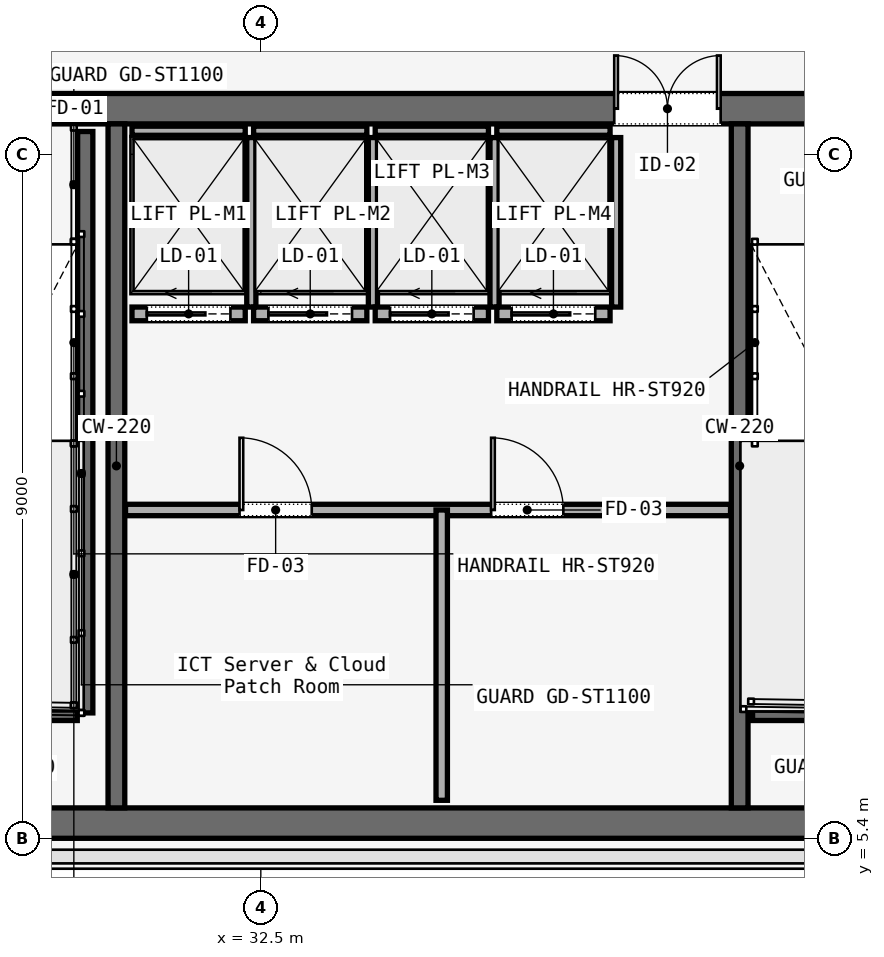
"""IFC4 building model, lengths in metres.
Left out: names, types, materials, properties, quantities, classifications, styles, units other than length and angle.
Written with IfcOpenShell. Run it as: python <this file> out.ifc"""

import sys

from ifc_helpers import new_model, si_unit, direction, frame, frame_2d, origin, place, context, subcontext, project, spatial, rectangle, extrude, element, fill, save


model = new_model("IFC4")
c1 = context("Model", 3, precision=1e-05, world=origin(), true_north=direction((0.0, 1.0)))
c2 = subcontext(c1, "Body", "Model", "MODEL_VIEW")
j1 = project(units=[si_unit("LENGTHUNIT", "METRE"), si_unit("PLANEANGLEUNIT", "RADIAN")], contexts=[c1])
p1 = place(None, origin())
s1 = spatial("IfcSite", under=j1, at=p1, CompositionType="ELEMENT")
p2 = place(p1, origin())
s2 = spatial("IfcBuilding", under=s1, at=p2, CompositionType="ELEMENT")
p3 = place(p2, frame((0.0, 0.0, 184.0)))
s3 = spatial("IfcBuildingStorey", under=s2, at=p3, CompositionType="ELEMENT", Elevation=184.0)
p4 = place(p3, frame((26.45, 15.0, 0.0), z_axis=(0.0, 0.0, 1.0), x_axis=(1.0, 0.0, 0.0)))
e1 = element("IfcWall", 1, at=p4, inside=s3, PredefinedType="SOLIDWALL", context=c2, shape_type="SweptSolid", body=[
    extrude(rectangle(XDim=31.1, YDim=0.4, at=frame_2d((15.55, 0.0))), origin(), (0.0, 0.0, 1.0), 3.58),
])
p5 = place(p4, frame((1.65, 0.0, 0.0)))
e2 = element("IfcOpeningElement", 2, at=p5, cuts=e1, PredefinedType="OPENING", context=c2, shape_type="SweptSolid", body=[
    extrude(rectangle(XDim=1.1, YDim=2.2, at=frame_2d((0.55, 1.1))), frame((0.0, 0.2, 0.0), z_axis=(0.0, -1.0, 0.0), x_axis=(1.0, 0.0, 0.0)), (0.0, 0.0, 1.0), 0.4),
])
p6 = place(p4, frame((13.65, 0.0, 0.0)))
e3 = element("IfcOpeningElement", 3, at=p6, cuts=e1, PredefinedType="OPENING", context=c2, shape_type="SweptSolid", body=[
    extrude(rectangle(XDim=1.1, YDim=2.2, at=frame_2d((0.55, 1.1))), frame((0.0, 0.2, 0.0), z_axis=(0.0, -1.0, 0.0), x_axis=(1.0, 0.0, 0.0)), (0.0, 0.0, 1.0), 0.4),
])
p7 = place(p4, frame((25.55, 0.0, 0.0)))
e4 = element("IfcOpeningElement", 4, at=p7, cuts=e1, PredefinedType="OPENING", context=c2, shape_type="SweptSolid", body=[
    extrude(rectangle(XDim=1.1, YDim=2.2, at=frame_2d((0.55, 1.1))), frame((0.0, 0.2, 0.0), z_axis=(0.0, -1.0, 0.0), x_axis=(1.0, 0.0, 0.0)), (0.0, 0.0, 1.0), 0.4),
])
p8 = place(p4, frame((10.7, 0.0, 0.0)))
e5 = element("IfcOpeningElement", 5, at=p8, cuts=e1, PredefinedType="OPENING", context=c2, shape_type="SweptSolid", body=[
    extrude(rectangle(XDim=1.4, YDim=2.2, at=frame_2d((0.7, 1.1))), frame((0.0, 0.2, 0.0), z_axis=(0.0, -1.0, 0.0), x_axis=(1.0, 0.0, 0.0)), (0.0, 0.0, 1.0), 0.4),
])
p9 = place(p4, frame((19.35, 0.0, 0.0)))
e6 = element("IfcOpeningElement", 6, at=p9, cuts=e1, PredefinedType="OPENING", context=c2, shape_type="SweptSolid", body=[
    extrude(rectangle(XDim=1.1, YDim=2.2, at=frame_2d((0.55, 1.1))), frame((0.0, 0.2, 0.0), z_axis=(0.0, -1.0, 0.0), x_axis=(1.0, 0.0, 0.0)), (0.0, 0.0, 1.0), 0.4),
])
p10 = place(p4, frame((21.4, 0.0, 0.0)))
e7 = element("IfcOpeningElement", 7, at=p10, cuts=e1, PredefinedType="OPENING", context=c2, shape_type="SweptSolid", body=[
    extrude(rectangle(XDim=0.9, YDim=2.1, at=frame_2d((0.45, 1.05))), frame((0.0, 0.2, 0.0), z_axis=(0.0, -1.0, 0.0), x_axis=(1.0, 0.0, 0.0)), (0.0, 0.0, 1.0), 0.4),
])
p11 = place(p4, frame((23.35, 0.0, 0.0)))
e8 = element("IfcOpeningElement", 8, at=p11, cuts=e1, PredefinedType="OPENING", context=c2, shape_type="SweptSolid", body=[
    extrude(rectangle(XDim=1.3, YDim=2.3, at=frame_2d((0.65, 1.15))), frame((0.0, 0.2, 0.0), z_axis=(0.0, -1.0, 0.0), x_axis=(1.0, 0.0, 0.0)), (0.0, 0.0, 1.0), 0.4),
])
p12 = place(p3, frame((26.45, 5.6, 0.0), z_axis=(0.0, 0.0, 1.0), x_axis=(1.0, 0.0, 0.0)))
e9 = element("IfcWall", 9, at=p12, inside=s3, PredefinedType="SOLIDWALL", context=c2, shape_type="SweptSolid", body=[
    extrude(rectangle(XDim=31.1, YDim=0.4, at=frame_2d((15.55, 0.0))), origin(), (0.0, 0.0, 1.0), 3.58),
])
for number, where, z_axis, x_axis in (
    (10, (30.6, 5.8, 0.0), (0.0, 0.0, 1.0), (0.0, 1.0, 0.0)),
    (11, (38.8, 5.8, 0.0), (0.0, 0.0, 1.0), (0.0, 1.0, 0.0)),
):
    element("IfcWall", number, at=place(p3, frame(where, z_axis=z_axis, x_axis=x_axis)), inside=s3, PredefinedType="SOLIDWALL", context=c2, shape_type="SweptSolid", body=[
        extrude(rectangle(XDim=9.0, YDim=0.22, at=frame_2d((4.5, 0.0))), origin(), (0.0, 0.0, 1.0), 3.58),
    ])
p13 = place(p3, frame((30.19, 14.7, 0.0), z_axis=(0.0, 0.0, 1.0), x_axis=(0.0, -1.0, 0.0)))
e12 = element("IfcWall", 12, at=p13, inside=s3, PredefinedType="SOLIDWALL", context=c2, shape_type="SweptSolid", body=[
    extrude(rectangle(XDim=7.65, YDim=0.2, at=frame_2d((3.825, 0.0))), origin(), (0.0, 0.0, 1.0), 3.8),
])
for number, where, z_axis, x_axis in (
    (13, (26.97, 7.05, 0.0), (0.0, 0.0, 1.0), (1.0, 0.0, 0.0)),
    (14, (38.97, 7.05, 0.0), (0.0, 0.0, 1.0), (1.0, 0.0, 0.0)),
):
    element("IfcWall", number, at=place(p3, frame(where, z_axis=z_axis, x_axis=x_axis)), inside=s3, PredefinedType="SOLIDWALL", context=c2, shape_type="SweptSolid", body=[
        extrude(rectangle(XDim=3.115, YDim=0.2, at=frame_2d((1.558, 0.0))), origin(), (0.0, 0.0, 1.0), 3.8),
    ])
p14 = place(p3, frame((30.72, 9.72, 0.0), z_axis=(0.0, 0.0, 1.0), x_axis=(1.0, 0.0, 0.0)))
e15 = element("IfcWall", 15, at=p14, inside=s3, PredefinedType="PARTITIONING", context=c2, shape_type="SweptSolid", body=[
    extrude(rectangle(XDim=7.96, YDim=0.15, at=frame_2d((3.98, 0.0))), origin(), (0.0, 0.0, 1.0), 3.01),
])
p15 = place(p14, frame((1.5, 0.0, 0.0)))
e16 = element("IfcOpeningElement", 16, at=p15, cuts=e15, PredefinedType="OPENING", context=c2, shape_type="SweptSolid", body=[
    extrude(rectangle(XDim=0.95, YDim=2.2, at=frame_2d((0.475, 1.1))), frame((0.0, 0.075, 0.0), z_axis=(0.0, -1.0, 0.0), x_axis=(1.0, 0.0, 0.0)), (0.0, 0.0, 1.0), 0.15),
])
p16 = place(p14, frame((4.81, 0.0, 0.0)))
e17 = element("IfcOpeningElement", 17, at=p16, cuts=e15, PredefinedType="OPENING", context=c2, shape_type="SweptSolid", body=[
    extrude(rectangle(XDim=0.95, YDim=2.2, at=frame_2d((0.475, 1.1))), frame((0.0, 0.075, 0.0), z_axis=(0.0, -1.0, 0.0), x_axis=(1.0, 0.0, 0.0)), (0.0, 0.0, 1.0), 0.15),
])
p17 = place(p3, frame((34.88, 5.9, 0.0), z_axis=(0.0, 0.0, 1.0), x_axis=(0.0, 1.0, 0.0)))
e18 = element("IfcWall", 18, at=p17, inside=s3, PredefinedType="PARTITIONING", context=c2, shape_type="SweptSolid", body=[
    extrude(rectangle(XDim=3.82, YDim=0.15, at=frame_2d((1.91, 0.0))), origin(), (0.0, 0.0, 1.0), 3.01),
])
p18 = place(p3, frame((30.805, 12.3, 0.0), z_axis=(0.0, 0.0, 1.0), x_axis=(1.0, 0.0, 0.0)))
e19 = element("IfcWall", 19, at=p18, inside=s3, PredefinedType="SOLIDWALL", context=c2, shape_type="SweptSolid", body=[
    extrude(rectangle(XDim=1.49, YDim=0.18, at=frame_2d((0.745, 0.0))), origin(), (0.0, 0.0, 1.0), 3.01),
])
p19 = place(p18, frame((0.195, 0.0, 0.0)))
e20 = element("IfcOpeningElement", 20, at=p19, cuts=e19, PredefinedType="OPENING", context=c2, shape_type="SweptSolid", body=[
    extrude(rectangle(XDim=1.1, YDim=2.2, at=frame_2d((0.55, 1.1))), frame((0.0, 0.09, 0.0), z_axis=(0.0, -1.0, 0.0), x_axis=(1.0, 0.0, 0.0)), (0.0, 0.0, 1.0), 0.18),
])
p20 = place(p3, frame((30.805, 14.71, 0.0), z_axis=(0.0, 0.0, 1.0), x_axis=(1.0, 0.0, 0.0)))
e21 = element("IfcWall", 21, at=p20, inside=s3, PredefinedType="SOLIDWALL", context=c2, shape_type="SweptSolid", body=[
    extrude(rectangle(XDim=1.49, YDim=0.12, at=frame_2d((0.745, 0.0))), origin(), (0.0, 0.0, 1.0), 3.01),
])
p21 = place(p3, frame((32.375, 12.39, 0.0), z_axis=(0.0, 0.0, 1.0), x_axis=(0.0, 1.0, 0.0)))
e22 = element("IfcWall", 22, at=p21, inside=s3, PredefinedType="SOLIDWALL", context=c2, shape_type="SweptSolid", body=[
    extrude(rectangle(XDim=2.23, YDim=0.12, at=frame_2d((1.115, 0.0))), origin(), (0.0, 0.0, 1.0), 3.01),
])
p22 = place(p3, frame((32.405, 12.3, 0.0), z_axis=(0.0, 0.0, 1.0), x_axis=(1.0, 0.0, 0.0)))
e23 = element("IfcWall", 23, at=p22, inside=s3, PredefinedType="SOLIDWALL", context=c2, shape_type="SweptSolid", body=[
    extrude(rectangle(XDim=1.49, YDim=0.18, at=frame_2d((0.745, 0.0))), origin(), (0.0, 0.0, 1.0), 3.01),
])
p23 = place(p22, frame((0.195, 0.0, 0.0)))
e24 = element("IfcOpeningElement", 24, at=p23, cuts=e23, PredefinedType="OPENING", context=c2, shape_type="SweptSolid", body=[
    extrude(rectangle(XDim=1.1, YDim=2.2, at=frame_2d((0.55, 1.1))), frame((0.0, 0.09, 0.0), z_axis=(0.0, -1.0, 0.0), x_axis=(1.0, 0.0, 0.0)), (0.0, 0.0, 1.0), 0.18),
])
p24 = place(p3, frame((32.405, 14.71, 0.0), z_axis=(0.0, 0.0, 1.0), x_axis=(1.0, 0.0, 0.0)))
e25 = element("IfcWall", 25, at=p24, inside=s3, PredefinedType="SOLIDWALL", context=c2, shape_type="SweptSolid", body=[
    extrude(rectangle(XDim=1.49, YDim=0.12, at=frame_2d((0.745, 0.0))), origin(), (0.0, 0.0, 1.0), 3.01),
])
p25 = place(p3, frame((33.975, 12.39, 0.0), z_axis=(0.0, 0.0, 1.0), x_axis=(0.0, 1.0, 0.0)))
e26 = element("IfcWall", 26, at=p25, inside=s3, PredefinedType="SOLIDWALL", context=c2, shape_type="SweptSolid", body=[
    extrude(rectangle(XDim=2.23, YDim=0.12, at=frame_2d((1.115, 0.0))), origin(), (0.0, 0.0, 1.0), 3.01),
])
p26 = place(p3, frame((34.005, 12.3, 0.0), z_axis=(0.0, 0.0, 1.0), x_axis=(1.0, 0.0, 0.0)))
e27 = element("IfcWall", 27, at=p26, inside=s3, PredefinedType="SOLIDWALL", context=c2, shape_type="SweptSolid", body=[
    extrude(rectangle(XDim=1.49, YDim=0.18, at=frame_2d((0.745, 0.0))), origin(), (0.0, 0.0, 1.0), 3.01),
])
p27 = place(p26, frame((0.195, 0.0, 0.0)))
e28 = element("IfcOpeningElement", 28, at=p27, cuts=e27, PredefinedType="OPENING", context=c2, shape_type="SweptSolid", body=[
    extrude(rectangle(XDim=1.1, YDim=2.2, at=frame_2d((0.55, 1.1))), frame((0.0, 0.09, 0.0), z_axis=(0.0, -1.0, 0.0), x_axis=(1.0, 0.0, 0.0)), (0.0, 0.0, 1.0), 0.18),
])
p28 = place(p3, frame((34.005, 14.71, 0.0), z_axis=(0.0, 0.0, 1.0), x_axis=(1.0, 0.0, 0.0)))
e29 = element("IfcWall", 29, at=p28, inside=s3, PredefinedType="SOLIDWALL", context=c2, shape_type="SweptSolid", body=[
    extrude(rectangle(XDim=1.49, YDim=0.12, at=frame_2d((0.745, 0.0))), origin(), (0.0, 0.0, 1.0), 3.01),
])
p29 = place(p3, frame((35.575, 12.39, 0.0), z_axis=(0.0, 0.0, 1.0), x_axis=(0.0, 1.0, 0.0)))
e30 = element("IfcWall", 30, at=p29, inside=s3, PredefinedType="SOLIDWALL", context=c2, shape_type="SweptSolid", body=[
    extrude(rectangle(XDim=2.23, YDim=0.12, at=frame_2d((1.115, 0.0))), origin(), (0.0, 0.0, 1.0), 3.01),
])
p30 = place(p3, frame((35.605, 12.3, 0.0), z_axis=(0.0, 0.0, 1.0), x_axis=(1.0, 0.0, 0.0)))
e31 = element("IfcWall", 31, at=p30, inside=s3, PredefinedType="SOLIDWALL", context=c2, shape_type="SweptSolid", body=[
    extrude(rectangle(XDim=1.49, YDim=0.18, at=frame_2d((0.745, 0.0))), origin(), (0.0, 0.0, 1.0), 3.01),
])
p31 = place(p30, frame((0.195, 0.0, 0.0)))
e32 = element("IfcOpeningElement", 32, at=p31, cuts=e31, PredefinedType="OPENING", context=c2, shape_type="SweptSolid", body=[
    extrude(rectangle(XDim=1.1, YDim=2.2, at=frame_2d((0.55, 1.1))), frame((0.0, 0.09, 0.0), z_axis=(0.0, -1.0, 0.0), x_axis=(1.0, 0.0, 0.0)), (0.0, 0.0, 1.0), 0.18),
])
p32 = place(p3, frame((35.605, 14.71, 0.0), z_axis=(0.0, 0.0, 1.0), x_axis=(1.0, 0.0, 0.0)))
e33 = element("IfcWall", 33, at=p32, inside=s3, PredefinedType="SOLIDWALL", context=c2, shape_type="SweptSolid", body=[
    extrude(rectangle(XDim=1.49, YDim=0.12, at=frame_2d((0.745, 0.0))), origin(), (0.0, 0.0, 1.0), 3.01),
])
p33 = place(p3, frame((37.175, 12.39, 0.0), z_axis=(0.0, 0.0, 1.0), x_axis=(0.0, 1.0, 0.0)))
e34 = element("IfcWall", 34, at=p33, inside=s3, PredefinedType="SOLIDWALL", context=c2, shape_type="SweptSolid", body=[
    extrude(rectangle(XDim=2.23, YDim=0.12, at=frame_2d((1.115, 0.0))), origin(), (0.0, 0.0, 1.0), 3.01),
])
p34 = place(p8, origin())
e35 = element("IfcDoor", 35, at=p34, inside=s3, OperationType="DOUBLE_DOOR_SINGLE_SWING", PredefinedType="DOOR", context=c2, shape_type="SweptSolid", body=[
    extrude(rectangle(XDim=1.4, YDim=2.2, at=frame_2d((0.7, 1.1))), frame((0.0, 0.025, 0.0), z_axis=(0.0, -1.0, 0.0), x_axis=(1.0, 0.0, 0.0)), (0.0, 0.0, 1.0), 0.05),
])
fill(e5, e35)
p35 = place(p15, origin())
e36 = element("IfcDoor", 36, at=p35, inside=s3, OperationType="SINGLE_SWING_LEFT", PredefinedType="DOOR", context=c2, shape_type="SweptSolid", body=[
    extrude(rectangle(XDim=0.95, YDim=2.2, at=frame_2d((0.475, 1.1))), frame((0.0, 0.025, 0.0), z_axis=(0.0, -1.0, 0.0), x_axis=(1.0, 0.0, 0.0)), (0.0, 0.0, 1.0), 0.05),
])
fill(e16, e36)
p36 = place(p16, origin())
e37 = element("IfcDoor", 37, at=p36, inside=s3, OperationType="SINGLE_SWING_RIGHT", PredefinedType="DOOR", context=c2, shape_type="SweptSolid", body=[
    extrude(rectangle(XDim=0.95, YDim=2.2, at=frame_2d((0.475, 1.1))), frame((0.0, 0.025, 0.0), z_axis=(0.0, -1.0, 0.0), x_axis=(1.0, 0.0, 0.0)), (0.0, 0.0, 1.0), 0.05),
])
fill(e17, e37)
p37 = place(p19, origin())
e38 = element("IfcDoor", 38, at=p37, inside=s3, OperationType="SLIDING_TO_LEFT", PredefinedType="DOOR", context=c2, shape_type="SweptSolid", body=[
    extrude(rectangle(XDim=1.1, YDim=2.2, at=frame_2d((0.55, 1.1))), frame((0.0, 0.025, 0.0), z_axis=(0.0, -1.0, 0.0), x_axis=(1.0, 0.0, 0.0)), (0.0, 0.0, 1.0), 0.05),
])
fill(e20, e38)
p38 = place(p23, origin())
e39 = element("IfcDoor", 39, at=p38, inside=s3, OperationType="SLIDING_TO_LEFT", PredefinedType="DOOR", context=c2, shape_type="SweptSolid", body=[
    extrude(rectangle(XDim=1.1, YDim=2.2, at=frame_2d((0.55, 1.1))), frame((0.0, 0.025, 0.0), z_axis=(0.0, -1.0, 0.0), x_axis=(1.0, 0.0, 0.0)), (0.0, 0.0, 1.0), 0.05),
])
fill(e24, e39)
p39 = place(p27, origin())
e40 = element("IfcDoor", 40, at=p39, inside=s3, OperationType="SLIDING_TO_LEFT", PredefinedType="DOOR", context=c2, shape_type="SweptSolid", body=[
    extrude(rectangle(XDim=1.1, YDim=2.2, at=frame_2d((0.55, 1.1))), frame((0.0, 0.025, 0.0), z_axis=(0.0, -1.0, 0.0), x_axis=(1.0, 0.0, 0.0)), (0.0, 0.0, 1.0), 0.05),
])
fill(e28, e40)
p40 = place(p31, origin())
e41 = element("IfcDoor", 41, at=p40, inside=s3, OperationType="SLIDING_TO_LEFT", PredefinedType="DOOR", context=c2, shape_type="SweptSolid", body=[
    extrude(rectangle(XDim=1.1, YDim=2.2, at=frame_2d((0.55, 1.1))), frame((0.0, 0.025, 0.0), z_axis=(0.0, -1.0, 0.0), x_axis=(1.0, 0.0, 0.0)), (0.0, 0.0, 1.0), 0.05),
])
fill(e32, e41)
save(model, sys.argv[1])
